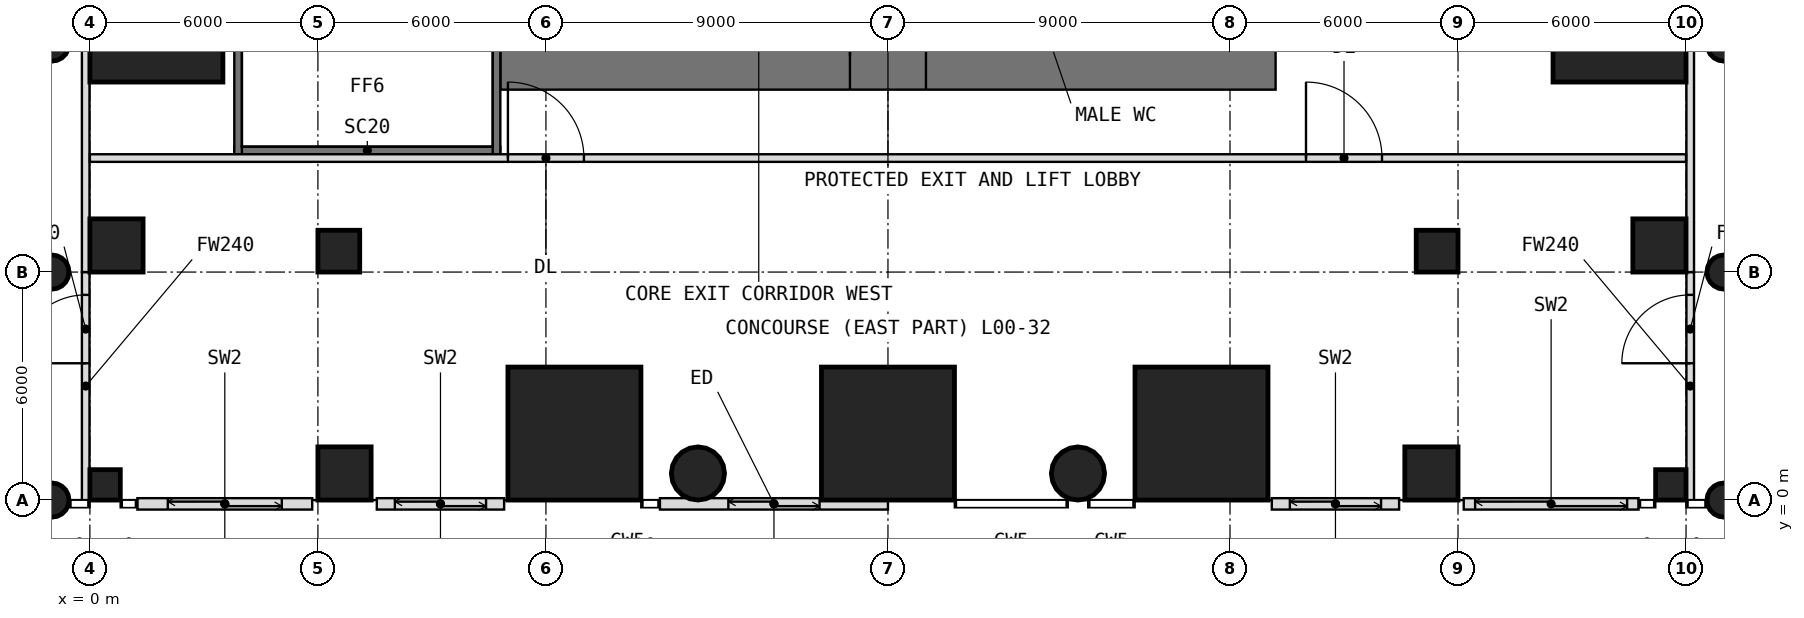
"""IFC4 building model, lengths in metres.
Left out: names, types, materials, properties, quantities, classifications, styles, units other than length and angle.
Written with IfcOpenShell. Run it as: python <this file> out.ifc"""

import sys

from ifc_helpers import new_model, si_unit, direction, frame, frame_2d, origin, origin_2d, place, context, subcontext, project, spatial, rectangle, circle, extrude, element, fill, save


model = new_model("IFC4")
c1 = context("Model", 3, precision=1e-05, world=origin(), true_north=direction((0.0, 1.0)))
c2 = subcontext(c1, "Body", "Model", "MODEL_VIEW")
j1 = project(units=[si_unit("LENGTHUNIT", "METRE"), si_unit("PLANEANGLEUNIT", "RADIAN")], contexts=[c1])
p1 = place(None, origin())
s1 = spatial("IfcSite", under=j1, at=p1, CompositionType="ELEMENT")
p2 = place(p1, origin())
s2 = spatial("IfcBuilding", under=s1, at=p2, CompositionType="ELEMENT")
p3 = place(p2, origin())
s3 = spatial("IfcBuildingStorey", under=s2, at=p3, CompositionType="ELEMENT", Elevation=0.0)
p4 = place(p3, frame((-1.0, 0.0, -0.4), z_axis=(0.0, 0.0, 1.0), x_axis=(1.0, 0.0, 0.0)))
e1 = element("IfcColumn", 1, at=p4, inside=s3, PredefinedType="COLUMN", context=c2, shape_type="SweptSolid", body=[
    extrude(circle(Radius=0.45, at=origin_2d()), origin(), (0.0, 0.0, 1.0), 6.4),
])
p5 = place(p3, frame((0.4, 0.4, -0.4), z_axis=(0.0, 0.0, 1.0), x_axis=(1.0, 0.0, 0.0)))
e2 = element("IfcColumn", 2, at=p5, inside=s3, PredefinedType="COLUMN", context=c2, shape_type="SweptSolid", body=[
    extrude(rectangle(XDim=0.8, YDim=0.8, at=origin_2d()), origin(), (0.0, 0.0, 1.0), 6.4),
])
p6 = place(p3, frame((6.7, 0.7, -0.4), z_axis=(0.0, 0.0, 1.0), x_axis=(1.0, 0.0, 0.0)))
e3 = element("IfcColumn", 3, at=p6, inside=s3, PredefinedType="COLUMN", context=c2, shape_type="SweptSolid", body=[
    extrude(rectangle(XDim=1.4, YDim=1.4, at=origin_2d()), origin(), (0.0, 0.0, 1.0), 6.4),
])
p7 = place(p3, frame((12.75, 1.75, -0.4), z_axis=(0.0, 0.0, 1.0), x_axis=(1.0, 0.0, 0.0)))
e4 = element("IfcColumn", 4, at=p7, inside=s3, PredefinedType="COLUMN", context=c2, shape_type="SweptSolid", body=[
    extrude(rectangle(XDim=3.5, YDim=3.5, at=origin_2d()), origin(), (0.0, 0.0, 1.0), 6.4),
])
p8 = place(p3, frame((16.0, 0.7, -0.4), z_axis=(0.0, 0.0, 1.0), x_axis=(1.0, 0.0, 0.0)))
e5 = element("IfcColumn", 5, at=p8, inside=s3, PredefinedType="COLUMN", context=c2, shape_type="SweptSolid", body=[
    extrude(circle(Radius=0.7, at=origin_2d()), origin(), (0.0, 0.0, 1.0), 6.4),
])
p9 = place(p3, frame((21.0, 1.75, -0.4), z_axis=(0.0, 0.0, 1.0), x_axis=(1.0, 0.0, 0.0)))
e6 = element("IfcColumn", 6, at=p9, inside=s3, PredefinedType="COLUMN", context=c2, shape_type="SweptSolid", body=[
    extrude(rectangle(XDim=3.5, YDim=3.5, at=origin_2d()), origin(), (0.0, 0.0, 1.0), 6.4),
])
p10 = place(p3, frame((26.0, 0.7, -0.4), z_axis=(0.0, 0.0, 1.0), x_axis=(1.0, 0.0, 0.0)))
e7 = element("IfcColumn", 7, at=p10, inside=s3, PredefinedType="COLUMN", context=c2, shape_type="SweptSolid", body=[
    extrude(circle(Radius=0.7, at=origin_2d()), origin(), (0.0, 0.0, 1.0), 6.4),
])
p11 = place(p3, frame((29.25, 1.75, -0.4), z_axis=(0.0, 0.0, 1.0), x_axis=(1.0, 0.0, 0.0)))
e8 = element("IfcColumn", 8, at=p11, inside=s3, PredefinedType="COLUMN", context=c2, shape_type="SweptSolid", body=[
    extrude(rectangle(XDim=3.5, YDim=3.5, at=origin_2d()), origin(), (0.0, 0.0, 1.0), 6.4),
])
p12 = place(p3, frame((35.3, 0.7, -0.4), z_axis=(0.0, 0.0, 1.0), x_axis=(1.0, 0.0, 0.0)))
e9 = element("IfcColumn", 9, at=p12, inside=s3, PredefinedType="COLUMN", context=c2, shape_type="SweptSolid", body=[
    extrude(rectangle(XDim=1.4, YDim=1.4, at=origin_2d()), origin(), (0.0, 0.0, 1.0), 6.4),
])
p13 = place(p3, frame((41.6, 0.4, -0.4), z_axis=(0.0, 0.0, 1.0), x_axis=(1.0, 0.0, 0.0)))
e10 = element("IfcColumn", 10, at=p13, inside=s3, PredefinedType="COLUMN", context=c2, shape_type="SweptSolid", body=[
    extrude(rectangle(XDim=0.8, YDim=0.8, at=origin_2d()), origin(), (0.0, 0.0, 1.0), 6.4),
])
for number, where, z_axis, x_axis in (
    (11, (43.0, 0.0, -0.4), (0.0, 0.0, 1.0), (1.0, 0.0, 0.0)),
    (12, (-1.0, 6.0, -0.4), (0.0, 0.0, 1.0), (1.0, 0.0, 0.0)),
):
    element("IfcColumn", number, at=place(p3, frame(where, z_axis=z_axis, x_axis=x_axis)), inside=s3, PredefinedType="COLUMN", context=c2, shape_type="SweptSolid", body=[
        extrude(circle(Radius=0.45, at=origin_2d()), origin(), (0.0, 0.0, 1.0), 6.4),
    ])
p14 = place(p3, frame((0.7, 6.7, -0.4), z_axis=(0.0, 0.0, 1.0), x_axis=(1.0, 0.0, 0.0)))
e13 = element("IfcColumn", 13, at=p14, inside=s3, PredefinedType="COLUMN", context=c2, shape_type="SweptSolid", body=[
    extrude(rectangle(XDim=1.4, YDim=1.4, at=origin_2d()), origin(), (0.0, 0.0, 1.0), 6.4),
])
for number, where, z_axis, x_axis in (
    (14, (6.55, 6.55, -0.4), (0.0, 0.0, 1.0), (1.0, 0.0, 0.0)),
    (15, (35.45, 6.55, -0.4), (0.0, 0.0, 1.0), (1.0, 0.0, 0.0)),
):
    element("IfcColumn", number, at=place(p3, frame(where, z_axis=z_axis, x_axis=x_axis)), inside=s3, PredefinedType="COLUMN", context=c2, shape_type="SweptSolid", body=[
        extrude(rectangle(XDim=1.1, YDim=1.1, at=origin_2d()), origin(), (0.0, 0.0, 1.0), 6.4),
    ])
p15 = place(p3, frame((41.3, 6.7, -0.4), z_axis=(0.0, 0.0, 1.0), x_axis=(1.0, 0.0, 0.0)))
e16 = element("IfcColumn", 16, at=p15, inside=s3, PredefinedType="COLUMN", context=c2, shape_type="SweptSolid", body=[
    extrude(rectangle(XDim=1.4, YDim=1.4, at=origin_2d()), origin(), (0.0, 0.0, 1.0), 6.4),
])
p16 = place(p3, frame((43.0, 6.0, -0.4), z_axis=(0.0, 0.0, 1.0), x_axis=(1.0, 0.0, 0.0)))
e17 = element("IfcColumn", 17, at=p16, inside=s3, PredefinedType="COLUMN", context=c2, shape_type="SweptSolid", body=[
    extrude(circle(Radius=0.45, at=origin_2d()), origin(), (0.0, 0.0, 1.0), 6.4),
])
for number, where, z_axis, x_axis in (
    (18, (1.75, 12.75, -0.4), (0.0, 0.0, 1.0), (1.0, 0.0, 0.0)),
    (19, (40.25, 12.75, -0.4), (0.0, 0.0, 1.0), (1.0, 0.0, 0.0)),
):
    element("IfcColumn", number, at=place(p3, frame(where, z_axis=z_axis, x_axis=x_axis)), inside=s3, PredefinedType="COLUMN", context=c2, shape_type="SweptSolid", body=[
        extrude(rectangle(XDim=3.5, YDim=3.5, at=origin_2d()), origin(), (0.0, 0.0, 1.0), 6.4),
    ])
for number, where, z_axis, x_axis in (
    (20, (-1.0, 12.0, -0.4), (0.0, 0.0, 1.0), (1.0, 0.0, 0.0)),
    (21, (43.0, 12.0, -0.4), (0.0, 0.0, 1.0), (1.0, 0.0, 0.0)),
):
    element("IfcColumn", number, at=place(p3, frame(where, z_axis=z_axis, x_axis=x_axis)), inside=s3, PredefinedType="COLUMN", context=c2, shape_type="SweptSolid", body=[
        extrude(circle(Radius=0.45, at=origin_2d()), origin(), (0.0, 0.0, 1.0), 6.4),
    ])
p17 = place(p3, frame((1.25, -0.1, 0.0), z_axis=(0.0, 0.0, 1.0), x_axis=(1.0, 0.0, 0.0)))
e22 = element("IfcWall", 22, at=p17, inside=s3, PredefinedType="USERDEFINED", context=c2, shape_type="SweptSolid", body=[
    extrude(rectangle(XDim=4.6, YDim=0.3, at=frame_2d((2.3, 0.0))), origin(), (0.0, 0.0, 1.0), 4.98),
])
p18 = place(p17, frame((0.8, 0.0, 0.0)))
e23 = element("IfcOpeningElement", 23, at=p18, cuts=e22, PredefinedType="OPENING", context=c2, shape_type="SweptSolid", body=[
    extrude(rectangle(XDim=3.0, YDim=3.0, at=frame_2d((1.5, 1.5))), frame((0.0, 0.16, 0.0), z_axis=(0.0, -1.0, 0.0), x_axis=(1.0, 0.0, 0.0)), (0.0, 0.0, 1.0), 0.32),
])
p19 = place(p3, frame((7.55, -0.1, 0.0), z_axis=(0.0, 0.0, 1.0), x_axis=(1.0, 0.0, 0.0)))
e24 = element("IfcWall", 24, at=p19, inside=s3, PredefinedType="USERDEFINED", context=c2, shape_type="SweptSolid", body=[
    extrude(rectangle(XDim=3.35, YDim=0.3, at=frame_2d((1.675, 0.0))), origin(), (0.0, 0.0, 1.0), 5.6),
])
p20 = place(p19, frame((0.475, 0.0, 0.0)))
e25 = element("IfcOpeningElement", 25, at=p20, cuts=e24, PredefinedType="OPENING", context=c2, shape_type="SweptSolid", body=[
    extrude(rectangle(XDim=2.4, YDim=3.0, at=frame_2d((1.2, 1.5))), frame((0.0, 0.16, 0.0), z_axis=(0.0, -1.0, 0.0), x_axis=(1.0, 0.0, 0.0)), (0.0, 0.0, 1.0), 0.32),
])
p21 = place(p3, frame((15.0, -0.1, 0.0), z_axis=(0.0, 0.0, 1.0), x_axis=(1.0, 0.0, 0.0)))
e26 = element("IfcWall", 26, at=p21, inside=s3, PredefinedType="USERDEFINED", context=c2, shape_type="SweptSolid", body=[
    extrude(rectangle(XDim=6.0, YDim=0.3, at=frame_2d((3.0, 0.0))), origin(), (0.0, 0.0, 1.0), 5.6),
])
p22 = place(p21, frame((1.8, 0.0, 0.0)))
e27 = element("IfcOpeningElement", 27, at=p22, cuts=e26, PredefinedType="OPENING", context=c2, shape_type="SweptSolid", body=[
    extrude(rectangle(XDim=2.4, YDim=3.0, at=frame_2d((1.2, 1.5))), frame((0.0, 0.16, 0.0), z_axis=(0.0, -1.0, 0.0), x_axis=(1.0, 0.0, 0.0)), (0.0, 0.0, 1.0), 0.32),
])
p23 = place(p3, frame((31.1, -0.1, 0.0), z_axis=(0.0, 0.0, 1.0), x_axis=(1.0, 0.0, 0.0)))
e28 = element("IfcWall", 28, at=p23, inside=s3, PredefinedType="USERDEFINED", context=c2, shape_type="SweptSolid", body=[
    extrude(rectangle(XDim=3.35, YDim=0.3, at=frame_2d((1.675, 0.0))), origin(), (0.0, 0.0, 1.0), 5.6),
])
p24 = place(p23, frame((0.475, 0.0, 0.0)))
e29 = element("IfcOpeningElement", 29, at=p24, cuts=e28, PredefinedType="OPENING", context=c2, shape_type="SweptSolid", body=[
    extrude(rectangle(XDim=2.4, YDim=3.0, at=frame_2d((1.2, 1.5))), frame((0.0, 0.16, 0.0), z_axis=(0.0, -1.0, 0.0), x_axis=(1.0, 0.0, 0.0)), (0.0, 0.0, 1.0), 0.32),
])
p25 = place(p3, frame((36.15, -0.1, 0.0), z_axis=(0.0, 0.0, 1.0), x_axis=(1.0, 0.0, 0.0)))
e30 = element("IfcWall", 30, at=p25, inside=s3, PredefinedType="USERDEFINED", context=c2, shape_type="SweptSolid", body=[
    extrude(rectangle(XDim=4.6, YDim=0.3, at=frame_2d((2.3, 0.0))), origin(), (0.0, 0.0, 1.0), 4.98),
])
p26 = place(p25, frame((0.3, 0.0, 0.0)))
e31 = element("IfcOpeningElement", 31, at=p26, cuts=e30, PredefinedType="OPENING", context=c2, shape_type="SweptSolid", body=[
    extrude(rectangle(XDim=4.0, YDim=3.0, at=frame_2d((2.0, 1.5))), frame((0.0, 0.16, 0.0), z_axis=(0.0, -1.0, 0.0), x_axis=(1.0, 0.0, 0.0)), (0.0, 0.0, 1.0), 0.32),
])
p27 = place(p3, frame((10.8, 11.7, 0.0), z_axis=(0.0, 0.0, 1.0), x_axis=(1.0, 0.0, 0.0)))
e32 = element("IfcWall", 32, at=p27, inside=s3, PredefinedType="SHEAR", context=c2, shape_type="SweptSolid", body=[
    extrude(rectangle(XDim=20.4, YDim=1.8, at=frame_2d((10.2, 0.0))), origin(), (0.0, 0.0, 1.0), 5.8),
])
p28 = place(p27, frame((9.2, 0.0, 0.0)))
e33 = element("IfcOpeningElement", 33, at=p28, cuts=e32, PredefinedType="OPENING", context=c2, shape_type="SweptSolid", body=[
    extrude(rectangle(XDim=2.0, YDim=2.2, at=frame_2d((1.0, 1.1))), frame((0.0, 0.91, 0.0), z_axis=(0.0, -1.0, 0.0), x_axis=(1.0, 0.0, 0.0)), (0.0, 0.0, 1.0), 1.82),
])
p29 = place(p3, frame((3.8, 9.2, 0.0), z_axis=(0.0, 0.0, 1.0), x_axis=(1.0, 0.0, 0.0)))
e34 = element("IfcWall", 34, at=p29, inside=s3, PredefinedType="SOLIDWALL", context=c2, shape_type="SweptSolid", body=[
    extrude(rectangle(XDim=7.0, YDim=0.2, at=frame_2d((3.5, 0.0))), origin(), (0.0, 0.0, 1.0), 5.8),
])
for number, where, z_axis, x_axis in (
    (35, (10.7, 9.1, 0.0), (0.0, 0.0, 1.0), (0.0, 1.0, 0.0)),
    (36, (3.9, 21.5, 0.0), (0.0, 0.0, 1.0), (0.0, -1.0, 0.0)),
):
    element("IfcWall", number, at=place(p3, frame(where, z_axis=z_axis, x_axis=x_axis)), inside=s3, PredefinedType="SOLIDWALL", context=c2, shape_type="SweptSolid", body=[
        extrude(rectangle(XDim=12.4, YDim=0.2, at=frame_2d((6.2, 0.0))), origin(), (0.0, 0.0, 1.0), 5.8),
    ])
p30 = place(p3, frame((-0.11, 0.0, 0.0), z_axis=(0.0, 0.0, 1.0), x_axis=(0.0, 1.0, 0.0)))
e37 = element("IfcWall", 37, at=p30, inside=s3, PredefinedType="PARTITIONING", context=c2, shape_type="SweptSolid", body=[
    extrude(rectangle(XDim=6.0, YDim=0.2, at=frame_2d((3.0, 0.0))), origin(), (0.0, 0.0, 1.0), 4.98),
])
p31 = place(p30, frame((3.6, 0.0, 0.0)))
e38 = element("IfcOpeningElement", 38, at=p31, cuts=e37, PredefinedType="OPENING", context=c2, shape_type="SweptSolid", body=[
    extrude(rectangle(XDim=1.8, YDim=2.4, at=frame_2d((0.9, 1.2))), frame((0.0, 0.11, 0.0), z_axis=(0.0, -1.0, 0.0), x_axis=(1.0, 0.0, 0.0)), (0.0, 0.0, 1.0), 0.22),
])
p32 = place(p3, frame((-0.11, 6.0, 0.0), z_axis=(0.0, 0.0, 1.0), x_axis=(0.0, 1.0, 0.0)))
e39 = element("IfcWall", 39, at=p32, inside=s3, PredefinedType="PARTITIONING", context=c2, shape_type="SweptSolid", body=[
    extrude(rectangle(XDim=30.0, YDim=0.2, at=frame_2d((15.0, 0.0))), origin(), (0.0, 0.0, 1.0), 5.6),
])
p33 = place(p3, frame((42.11, 0.0, 0.0), z_axis=(0.0, 0.0, 1.0), x_axis=(0.0, 1.0, 0.0)))
e40 = element("IfcWall", 40, at=p33, inside=s3, PredefinedType="PARTITIONING", context=c2, shape_type="SweptSolid", body=[
    extrude(rectangle(XDim=6.0, YDim=0.2, at=frame_2d((3.0, 0.0))), origin(), (0.0, 0.0, 1.0), 4.98),
])
p34 = place(p33, frame((3.6, 0.0, 0.0)))
e41 = element("IfcOpeningElement", 41, at=p34, cuts=e40, PredefinedType="OPENING", context=c2, shape_type="SweptSolid", body=[
    extrude(rectangle(XDim=1.8, YDim=2.4, at=frame_2d((0.9, 1.2))), frame((0.0, 0.11, 0.0), z_axis=(0.0, -1.0, 0.0), x_axis=(1.0, 0.0, 0.0)), (0.0, 0.0, 1.0), 0.22),
])
p35 = place(p3, frame((42.11, 6.0, 0.0), z_axis=(0.0, 0.0, 1.0), x_axis=(0.0, 1.0, 0.0)))
e42 = element("IfcWall", 42, at=p35, inside=s3, PredefinedType="PARTITIONING", context=c2, shape_type="SweptSolid", body=[
    extrude(rectangle(XDim=30.0, YDim=0.2, at=frame_2d((15.0, 0.0))), origin(), (0.0, 0.0, 1.0), 5.6),
])
p36 = place(p35, frame((11.3, 0.0, 0.0)))
e43 = element("IfcOpeningElement", 43, at=p36, cuts=e42, PredefinedType="OPENING", context=c2, shape_type="SweptSolid", body=[
    extrude(rectangle(XDim=1.8, YDim=2.4, at=frame_2d((0.9, 1.2))), frame((0.0, 0.11, 0.0), z_axis=(0.0, -1.0, 0.0), x_axis=(1.0, 0.0, 0.0)), (0.0, 0.0, 1.0), 0.22),
])
p37 = place(p35, frame((26.1, 0.0, 0.0)))
e44 = element("IfcOpeningElement", 44, at=p37, cuts=e42, PredefinedType="OPENING", context=c2, shape_type="SweptSolid", body=[
    extrude(rectangle(XDim=1.8, YDim=2.4, at=frame_2d((0.9, 1.2))), frame((0.0, 0.11, 0.0), z_axis=(0.0, -1.0, 0.0), x_axis=(1.0, 0.0, 0.0)), (0.0, 0.0, 1.0), 0.22),
])
p38 = place(p3, frame((0.0, 9.0, 0.0), z_axis=(0.0, 0.0, 1.0), x_axis=(1.0, 0.0, 0.0)))
e45 = element("IfcWall", 45, at=p38, inside=s3, PredefinedType="PARTITIONING", context=c2, shape_type="SweptSolid", body=[
    extrude(rectangle(XDim=42.0, YDim=0.2, at=frame_2d((21.0, 0.0))), origin(), (0.0, 0.0, 1.0), 5.6),
])
p39 = place(p38, frame((11.0, 0.0, 0.0)))
e46 = element("IfcOpeningElement", 46, at=p39, cuts=e45, PredefinedType="OPENING", context=c2, shape_type="SweptSolid", body=[
    extrude(rectangle(XDim=2.0, YDim=2.2, at=frame_2d((1.0, 1.1))), frame((0.0, 0.11, 0.0), z_axis=(0.0, -1.0, 0.0), x_axis=(1.0, 0.0, 0.0)), (0.0, 0.0, 1.0), 0.22),
])
p40 = place(p38, frame((32.0, 0.0, 0.0)))
e47 = element("IfcOpeningElement", 47, at=p40, cuts=e45, PredefinedType="OPENING", context=c2, shape_type="SweptSolid", body=[
    extrude(rectangle(XDim=2.0, YDim=2.2, at=frame_2d((1.0, 1.1))), frame((0.0, 0.11, 0.0), z_axis=(0.0, -1.0, 0.0), x_axis=(1.0, 0.0, 0.0)), (0.0, 0.0, 1.0), 0.22),
])
p41 = place(p18, origin())
e48 = element("IfcDoor", 48, at=p41, inside=s3, OperationType="DOUBLE_DOOR_SLIDING", PredefinedType="DOOR", context=c2, shape_type="SweptSolid", body=[
    extrude(rectangle(XDim=3.0, YDim=3.0, at=frame_2d((1.5, 1.5))), frame((0.0, 0.025, 0.0), z_axis=(0.0, -1.0, 0.0), x_axis=(1.0, 0.0, 0.0)), (0.0, 0.0, 1.0), 0.05),
])
fill(e23, e48)
p42 = place(p20, origin())
e49 = element("IfcDoor", 49, at=p42, inside=s3, OperationType="DOUBLE_DOOR_SLIDING", PredefinedType="DOOR", context=c2, shape_type="SweptSolid", body=[
    extrude(rectangle(XDim=2.4, YDim=3.0, at=frame_2d((1.2, 1.5))), frame((0.0, 0.025, 0.0), z_axis=(0.0, -1.0, 0.0), x_axis=(1.0, 0.0, 0.0)), (0.0, 0.0, 1.0), 0.05),
])
fill(e25, e49)
p43 = place(p22, origin())
e50 = element("IfcDoor", 50, at=p43, inside=s3, OperationType="DOUBLE_DOOR_SLIDING", PredefinedType="DOOR", context=c2, shape_type="SweptSolid", body=[
    extrude(rectangle(XDim=2.4, YDim=3.0, at=frame_2d((1.2, 1.5))), frame((0.0, 0.025, 0.0), z_axis=(0.0, -1.0, 0.0), x_axis=(1.0, 0.0, 0.0)), (0.0, 0.0, 1.0), 0.05),
])
fill(e27, e50)
p44 = place(p24, origin())
e51 = element("IfcDoor", 51, at=p44, inside=s3, OperationType="DOUBLE_DOOR_SLIDING", PredefinedType="DOOR", context=c2, shape_type="SweptSolid", body=[
    extrude(rectangle(XDim=2.4, YDim=3.0, at=frame_2d((1.2, 1.5))), frame((0.0, 0.025, 0.0), z_axis=(0.0, -1.0, 0.0), x_axis=(1.0, 0.0, 0.0)), (0.0, 0.0, 1.0), 0.05),
])
fill(e29, e51)
p45 = place(p26, origin())
e52 = element("IfcDoor", 52, at=p45, inside=s3, OperationType="DOUBLE_DOOR_SLIDING", PredefinedType="DOOR", context=c2, shape_type="SweptSolid", body=[
    extrude(rectangle(XDim=4.0, YDim=3.0, at=frame_2d((2.0, 1.5))), frame((0.0, 0.025, 0.0), z_axis=(0.0, -1.0, 0.0), x_axis=(1.0, 0.0, 0.0)), (0.0, 0.0, 1.0), 0.05),
])
fill(e31, e52)
p46 = place(p28, origin())
e53 = element("IfcDoor", 53, at=p46, inside=s3, OperationType="DOUBLE_DOOR_SINGLE_SWING", PredefinedType="DOOR", context=c2, shape_type="SweptSolid", body=[
    extrude(rectangle(XDim=2.0, YDim=2.2, at=frame_2d((1.0, 1.1))), frame((0.0, 0.025, 0.0), z_axis=(0.0, -1.0, 0.0), x_axis=(1.0, 0.0, 0.0)), (0.0, 0.0, 1.0), 0.05),
])
fill(e33, e53)
p47 = place(p31, origin())
e54 = element("IfcDoor", 54, at=p47, inside=s3, OperationType="DOUBLE_DOOR_SINGLE_SWING", PredefinedType="DOOR", context=c2, shape_type="SweptSolid", body=[
    extrude(rectangle(XDim=1.8, YDim=2.4, at=frame_2d((0.9, 1.2))), frame((0.0, 0.025, 0.0), z_axis=(0.0, -1.0, 0.0), x_axis=(1.0, 0.0, 0.0)), (0.0, 0.0, 1.0), 0.05),
])
fill(e38, e54)
p48 = place(p34, origin())
e55 = element("IfcDoor", 55, at=p48, inside=s3, OperationType="DOUBLE_DOOR_SINGLE_SWING", PredefinedType="DOOR", context=c2, shape_type="SweptSolid", body=[
    extrude(rectangle(XDim=1.8, YDim=2.4, at=frame_2d((0.9, 1.2))), frame((0.0, 0.025, 0.0), z_axis=(0.0, -1.0, 0.0), x_axis=(1.0, 0.0, 0.0)), (0.0, 0.0, 1.0), 0.05),
])
fill(e41, e55)
p49 = place(p39, origin())
e56 = element("IfcDoor", 56, at=p49, inside=s3, OperationType="DOUBLE_DOOR_SINGLE_SWING", PredefinedType="DOOR", context=c2, shape_type="SweptSolid", body=[
    extrude(rectangle(XDim=2.0, YDim=2.2, at=frame_2d((1.0, 1.1))), frame((0.0, 0.025, 0.0), z_axis=(0.0, -1.0, 0.0), x_axis=(1.0, 0.0, 0.0)), (0.0, 0.0, 1.0), 0.05),
])
fill(e46, e56)
p50 = place(p40, origin())
e57 = element("IfcDoor", 57, at=p50, inside=s3, OperationType="DOUBLE_DOOR_SINGLE_SWING", PredefinedType="DOOR", context=c2, shape_type="SweptSolid", body=[
    extrude(rectangle(XDim=2.0, YDim=2.2, at=frame_2d((1.0, 1.1))), frame((0.0, 0.025, 0.0), z_axis=(0.0, -1.0, 0.0), x_axis=(1.0, 0.0, 0.0)), (0.0, 0.0, 1.0), 0.05),
])
fill(e47, e57)
save(model, sys.argv[1])
